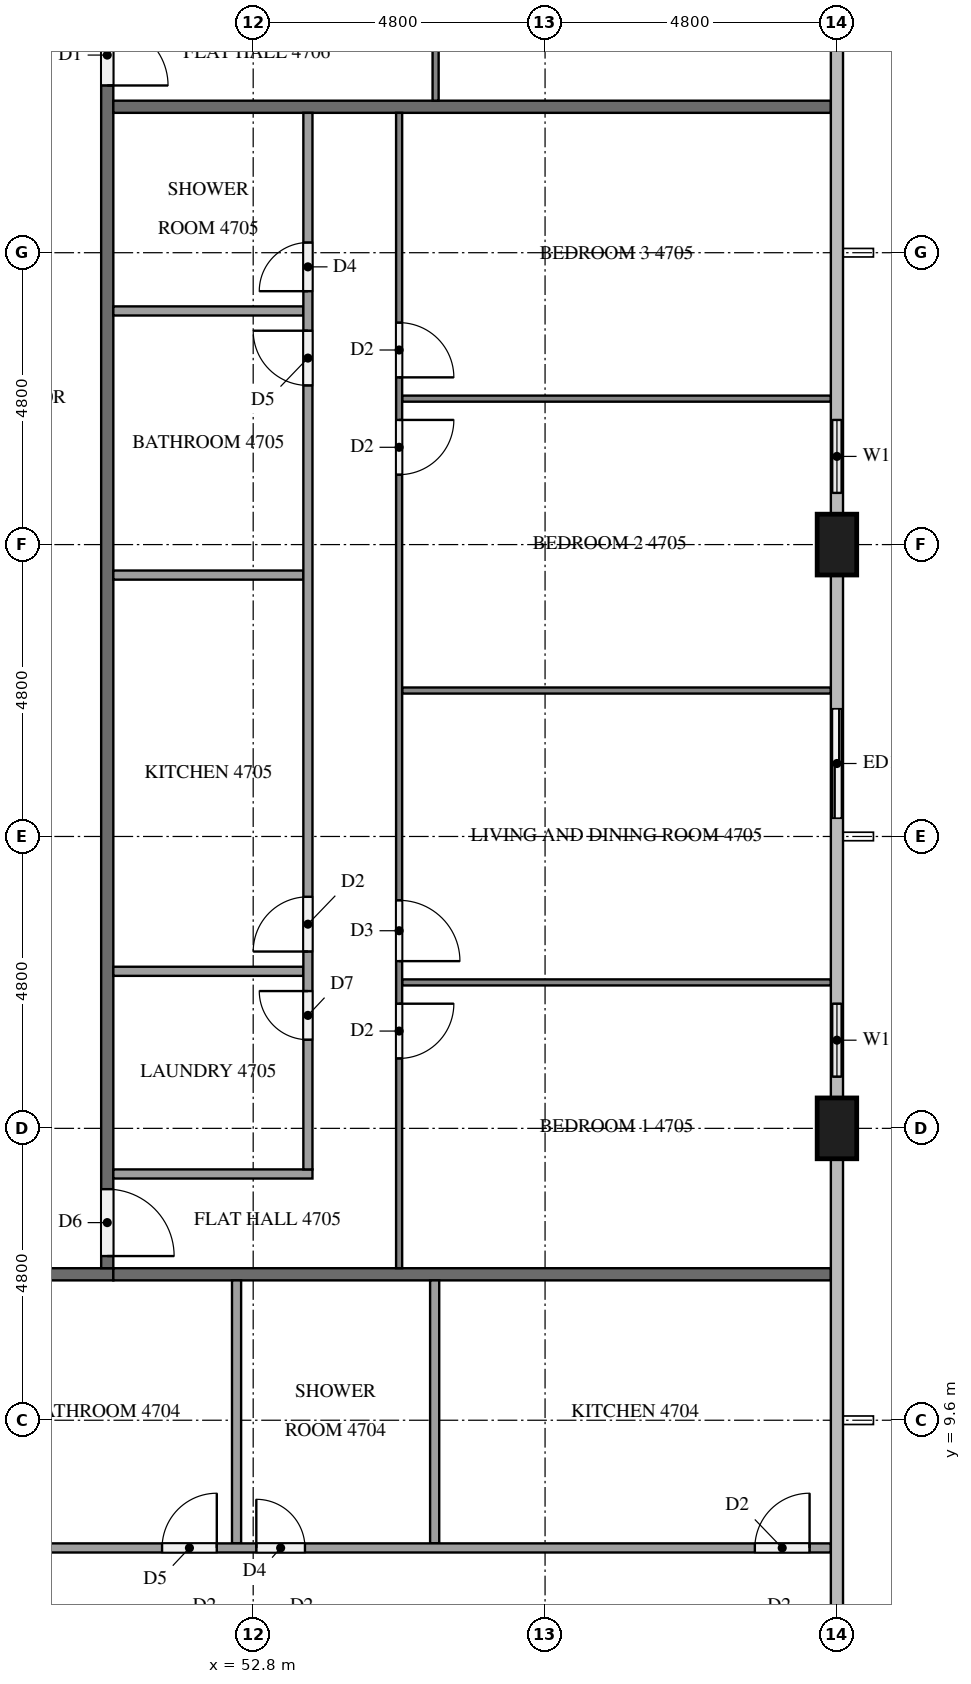
"""IFC4 building model, lengths in metres.
Left out: names, types, materials, properties, quantities, classifications, styles, units other than length and angle.
Written with IfcOpenShell. Run it as: python <this file> out.ifc"""

import sys

from ifc_helpers import new_model, si_unit, direction, frame, frame_2d, origin, origin_2d, place, context, subcontext, project, spatial, rectangle, extrude, element, fill, save


model = new_model("IFC4")
c1 = context("Model", 3, precision=1e-05, world=origin(), true_north=direction((0.0, 1.0)))
c2 = subcontext(c1, "Body", "Model", "MODEL_VIEW")
j1 = project(units=[si_unit("LENGTHUNIT", "METRE"), si_unit("PLANEANGLEUNIT", "RADIAN")], contexts=[c1])
p1 = place(None, origin())
s1 = spatial("IfcSite", under=j1, at=p1, CompositionType="ELEMENT")
p2 = place(p1, origin())
s2 = spatial("IfcBuilding", under=s1, at=p2, CompositionType="ELEMENT")
p3 = place(p2, frame((0.0, 0.0, 182.4)))
s3 = spatial("IfcBuildingStorey", under=s2, at=p3, CompositionType="ELEMENT", Elevation=182.4)
for number, where, z_axis, x_axis in (
    (1, (62.4, 14.4, 0.0), (0.0, 0.0, 1.0), (0.0, 1.0, 0.0)),
    (2, (62.4, 24.0, 0.0), (0.0, 0.0, 1.0), (0.0, 1.0, 0.0)),
):
    element("IfcColumn", number, at=place(p3, frame(where, z_axis=z_axis, x_axis=x_axis)), inside=s3, PredefinedType="COLUMN", context=c2, shape_type="SweptSolid", body=[
        extrude(rectangle(XDim=1.0, YDim=0.65, at=origin_2d()), origin(), (0.0, 0.0, 1.0), 3.2),
    ])
p4 = place(p3, frame((62.4, 14.9, 0.0), z_axis=(0.0, 0.0, 1.0), x_axis=(0.0, 1.0, 0.0)))
e3 = element("IfcWall", 3, at=p4, inside=s3, PredefinedType="SOLIDWALL", context=c2, shape_type="SweptSolid", body=[
    extrude(rectangle(XDim=1.9, YDim=0.15, at=frame_2d((0.95, 0.0))), origin(), (0.0, 0.0, 1.0), 3.2),
])
p5 = place(p4, frame((0.35, 0.0, 0.9)))
e4 = element("IfcOpeningElement", 4, at=p5, cuts=e3, PredefinedType="OPENING", context=c2, shape_type="SweptSolid", body=[
    extrude(rectangle(XDim=1.2, YDim=1.4, at=frame_2d((0.6, 0.7))), frame((0.0, 0.085, 0.0), z_axis=(0.0, -1.0, 0.0), x_axis=(1.0, 0.0, 0.0)), (0.0, 0.0, 1.0), 0.17),
])
p6 = place(p3, frame((62.4, 19.2, 0.0), z_axis=(0.0, 0.0, 1.0), x_axis=(0.0, 1.0, 0.0)))
e5 = element("IfcWall", 5, at=p6, inside=s3, PredefinedType="SOLIDWALL", context=c2, shape_type="SweptSolid", body=[
    extrude(rectangle(XDim=2.4, YDim=0.15, at=frame_2d((1.2, 0.0))), origin(), (0.0, 0.0, 1.0), 3.2),
])
p7 = place(p6, frame((0.3, 0.0, 0.0)))
e6 = element("IfcOpeningElement", 6, at=p7, cuts=e5, PredefinedType="OPENING", context=c2, shape_type="SweptSolid", body=[
    extrude(rectangle(XDim=1.8, YDim=2.4, at=frame_2d((0.9, 1.2))), frame((0.0, 0.085, 0.0), z_axis=(0.0, -1.0, 0.0), x_axis=(1.0, 0.0, 0.0)), (0.0, 0.0, 1.0), 0.17),
])
p8 = place(p3, frame((62.4, 24.5, 0.0), z_axis=(0.0, 0.0, 1.0), x_axis=(0.0, 1.0, 0.0)))
e7 = element("IfcWall", 7, at=p8, inside=s3, PredefinedType="SOLIDWALL", context=c2, shape_type="SweptSolid", body=[
    extrude(rectangle(XDim=1.9, YDim=0.15, at=frame_2d((0.95, 0.0))), origin(), (0.0, 0.0, 1.0), 3.2),
])
p9 = place(p8, frame((0.35, 0.0, 0.9)))
e8 = element("IfcOpeningElement", 8, at=p9, cuts=e7, PredefinedType="OPENING", context=c2, shape_type="SweptSolid", body=[
    extrude(rectangle(XDim=1.2, YDim=1.4, at=frame_2d((0.6, 0.7))), frame((0.0, 0.085, 0.0), z_axis=(0.0, -1.0, 0.0), x_axis=(1.0, 0.0, 0.0)), (0.0, 0.0, 1.0), 0.17),
])
p10 = place(p3, frame((50.5, 12.0, 0.0), z_axis=(0.0, 0.0, 1.0), x_axis=(-1.0, 0.0, 0.0)))
e9 = element("IfcWall", 9, at=p10, inside=s3, PredefinedType="PARTITIONING", context=c2, shape_type="SweptSolid", body=[
    extrude(rectangle(XDim=38.6, YDim=0.2, at=frame_2d((19.3, 0.0))), origin(), (0.0, 0.0, 1.0), 3.2),
])
p11 = place(p10, frame((31.65, 0.0, 0.0)))
e10 = element("IfcOpeningElement", 10, at=p11, cuts=e9, PredefinedType="OPENING", context=c2, shape_type="SweptSolid", body=[
    extrude(rectangle(XDim=1.0, YDim=2.1, at=frame_2d((0.5, 1.05))), frame((0.0, 0.11, 0.0), z_axis=(0.0, -1.0, 0.0), x_axis=(1.0, 0.0, 0.0)), (0.0, 0.0, 1.0), 0.22),
])
p12 = place(p10, frame((17.25, 0.0, 0.0)))
e11 = element("IfcOpeningElement", 11, at=p12, cuts=e9, PredefinedType="OPENING", context=c2, shape_type="SweptSolid", body=[
    extrude(rectangle(XDim=1.0, YDim=2.1, at=frame_2d((0.5, 1.05))), frame((0.0, 0.11, 0.0), z_axis=(0.0, -1.0, 0.0), x_axis=(1.0, 0.0, 0.0)), (0.0, 0.0, 1.0), 0.22),
])
p13 = place(p10, frame((7.65, 0.0, 0.0)))
e12 = element("IfcOpeningElement", 12, at=p13, cuts=e9, PredefinedType="OPENING", context=c2, shape_type="SweptSolid", body=[
    extrude(rectangle(XDim=1.0, YDim=2.1, at=frame_2d((0.5, 1.05))), frame((0.0, 0.11, 0.0), z_axis=(0.0, -1.0, 0.0), x_axis=(1.0, 0.0, 0.0)), (0.0, 0.0, 1.0), 0.22),
])
p14 = place(p10, frame((5.9, 0.0, 0.0)))
e13 = element("IfcOpeningElement", 13, at=p14, cuts=e9, PredefinedType="OPENING", context=c2, shape_type="SweptSolid", body=[
    extrude(rectangle(XDim=1.1, YDim=2.1, at=frame_2d((0.55, 1.05))), frame((0.0, 0.11, 0.0), z_axis=(0.0, -1.0, 0.0), x_axis=(1.0, 0.0, 0.0)), (0.0, 0.0, 1.0), 0.22),
])
p15 = place(p3, frame((50.4, 40.7, 0.0), z_axis=(0.0, 0.0, 1.0), x_axis=(0.0, -1.0, 0.0)))
e14 = element("IfcWall", 14, at=p15, inside=s3, PredefinedType="PARTITIONING", context=c2, shape_type="SweptSolid", body=[
    extrude(rectangle(XDim=28.6, YDim=0.2, at=frame_2d((14.3, 0.0))), origin(), (0.0, 0.0, 1.0), 3.2),
])
p16 = place(p15, frame((27.3, 0.0, 0.0)))
e15 = element("IfcOpeningElement", 15, at=p16, cuts=e14, PredefinedType="OPENING", context=c2, shape_type="SweptSolid", body=[
    extrude(rectangle(XDim=1.1, YDim=2.1, at=frame_2d((0.55, 1.05))), frame((0.0, 0.11, 0.0), z_axis=(0.0, -1.0, 0.0), x_axis=(1.0, 0.0, 0.0)), (0.0, 0.0, 1.0), 0.22),
])
p17 = place(p15, frame((8.15, 0.0, 0.0)))
e16 = element("IfcOpeningElement", 16, at=p17, cuts=e14, PredefinedType="OPENING", context=c2, shape_type="SweptSolid", body=[
    extrude(rectangle(XDim=1.0, YDim=2.1, at=frame_2d((0.5, 1.05))), frame((0.0, 0.11, 0.0), z_axis=(0.0, -1.0, 0.0), x_axis=(1.0, 0.0, 0.0)), (0.0, 0.0, 1.0), 0.22),
])
p18 = place(p15, frame((0.95, 0.0, 0.0)))
e17 = element("IfcOpeningElement", 17, at=p18, cuts=e14, PredefinedType="OPENING", context=c2, shape_type="SweptSolid", body=[
    extrude(rectangle(XDim=1.0, YDim=2.1, at=frame_2d((0.5, 1.05))), frame((0.0, 0.11, 0.0), z_axis=(0.0, -1.0, 0.0), x_axis=(1.0, 0.0, 0.0)), (0.0, 0.0, 1.0), 0.22),
])
for number, where, z_axis, x_axis in (
    (18, (50.5, 12.0, 0.0), (0.0, 0.0, 1.0), (1.0, 0.0, 0.0)),
    (19, (50.5, 31.2, 0.0), (0.0, 0.0, 1.0), (1.0, 0.0, 0.0)),
):
    element("IfcWall", number, at=place(p3, frame(where, z_axis=z_axis, x_axis=x_axis)), inside=s3, PredefinedType="PARTITIONING", context=c2, shape_type="SweptSolid", body=[
        extrude(rectangle(XDim=11.8, YDim=0.2, at=frame_2d((5.9, 0.0))), origin(), (0.0, 0.0, 1.0), 3.2),
    ])
for number, where, z_axis, x_axis in (
    (20, (52.527, 11.9, 0.0), (0.0, 0.0, 1.0), (0.0, -1.0, 0.0)),
    (21, (55.784, 11.9, 0.0), (0.0, 0.0, 1.0), (0.0, -1.0, 0.0)),
):
    element("IfcWall", number, at=place(p3, frame(where, z_axis=z_axis, x_axis=x_axis)), inside=s3, PredefinedType="PARTITIONING", context=c2, shape_type="SweptSolid", body=[
        extrude(rectangle(XDim=4.325, YDim=0.15, at=frame_2d((2.163, 0.0))), origin(), (0.0, 0.0, 1.0), 3.2),
    ])
p19 = place(p3, frame((44.925, 7.5, 0.0), z_axis=(0.0, 0.0, 1.0), x_axis=(1.0, 0.0, 0.0)))
e22 = element("IfcWall", 22, at=p19, inside=s3, PredefinedType="PARTITIONING", context=c2, shape_type="SweptSolid", body=[
    extrude(rectangle(XDim=17.375, YDim=0.15, at=frame_2d((8.688, 0.0))), origin(), (0.0, 0.0, 1.0), 3.2),
])
p20 = place(p19, frame((0.3, 0.0, 0.0)))
e23 = element("IfcOpeningElement", 23, at=p20, cuts=e22, PredefinedType="OPENING", context=c2, shape_type="SweptSolid", body=[
    extrude(rectangle(XDim=0.8, YDim=2.1, at=frame_2d((0.4, 1.05))), frame((0.0, 0.085, 0.0), z_axis=(0.0, -1.0, 0.0), x_axis=(1.0, 0.0, 0.0)), (0.0, 0.0, 1.0), 0.17),
])
p21 = place(p19, frame((6.377, 0.0, 0.0)))
e24 = element("IfcOpeningElement", 24, at=p21, cuts=e22, PredefinedType="OPENING", context=c2, shape_type="SweptSolid", body=[
    extrude(rectangle(XDim=0.9, YDim=2.1, at=frame_2d((0.45, 1.05))), frame((0.0, 0.085, 0.0), z_axis=(0.0, -1.0, 0.0), x_axis=(1.0, 0.0, 0.0)), (0.0, 0.0, 1.0), 0.17),
])
p22 = place(p19, frame((7.927, 0.0, 0.0)))
e25 = element("IfcOpeningElement", 25, at=p22, cuts=e22, PredefinedType="OPENING", context=c2, shape_type="SweptSolid", body=[
    extrude(rectangle(XDim=0.8, YDim=2.1, at=frame_2d((0.4, 1.05))), frame((0.0, 0.085, 0.0), z_axis=(0.0, -1.0, 0.0), x_axis=(1.0, 0.0, 0.0)), (0.0, 0.0, 1.0), 0.17),
])
p23 = place(p19, frame((16.125, 0.0, 0.0)))
e26 = element("IfcOpeningElement", 26, at=p23, cuts=e22, PredefinedType="OPENING", context=c2, shape_type="SweptSolid", body=[
    extrude(rectangle(XDim=0.9, YDim=2.1, at=frame_2d((0.45, 1.05))), frame((0.0, 0.085, 0.0), z_axis=(0.0, -1.0, 0.0), x_axis=(1.0, 0.0, 0.0)), (0.0, 0.0, 1.0), 0.17),
])
for number, where, z_axis, x_axis in (
    (27, (55.25, 16.8, 0.0), (0.0, 0.0, 1.0), (1.0, 0.0, 0.0)),
    (28, (55.25, 21.6, 0.0), (0.0, 0.0, 1.0), (1.0, 0.0, 0.0)),
    (29, (55.25, 26.4, 0.0), (0.0, 0.0, 1.0), (1.0, 0.0, 0.0)),
):
    element("IfcWall", number, at=place(p3, frame(where, z_axis=z_axis, x_axis=x_axis)), inside=s3, PredefinedType="PARTITIONING", context=c2, shape_type="SweptSolid", body=[
        extrude(rectangle(XDim=7.05, YDim=0.1, at=frame_2d((3.525, 0.0))), origin(), (0.0, 0.0, 1.0), 3.2),
    ])
p24 = place(p3, frame((55.2, 31.1, 0.0), z_axis=(0.0, 0.0, 1.0), x_axis=(0.0, -1.0, 0.0)))
e30 = element("IfcWall", 30, at=p24, inside=s3, PredefinedType="PARTITIONING", context=c2, shape_type="SweptSolid", body=[
    extrude(rectangle(XDim=19.0, YDim=0.1, at=frame_2d((9.5, 0.0))), origin(), (0.0, 0.0, 1.0), 3.2),
])
p25 = place(p24, frame((14.65, 0.0, 0.0)))
e31 = element("IfcOpeningElement", 31, at=p25, cuts=e30, PredefinedType="OPENING", context=c2, shape_type="SweptSolid", body=[
    extrude(rectangle(XDim=0.9, YDim=2.1, at=frame_2d((0.45, 1.05))), frame((0.0, 0.06, 0.0), z_axis=(0.0, -1.0, 0.0), x_axis=(1.0, 0.0, 0.0)), (0.0, 0.0, 1.0), 0.12),
])
p26 = place(p24, frame((12.95, 0.0, 0.0)))
e32 = element("IfcOpeningElement", 32, at=p26, cuts=e30, PredefinedType="OPENING", context=c2, shape_type="SweptSolid", body=[
    extrude(rectangle(XDim=1.0, YDim=2.1, at=frame_2d((0.5, 1.05))), frame((0.0, 0.06, 0.0), z_axis=(0.0, -1.0, 0.0), x_axis=(1.0, 0.0, 0.0)), (0.0, 0.0, 1.0), 0.12),
])
p27 = place(p24, frame((5.05, 0.0, 0.0)))
e33 = element("IfcOpeningElement", 33, at=p27, cuts=e30, PredefinedType="OPENING", context=c2, shape_type="SweptSolid", body=[
    extrude(rectangle(XDim=0.9, YDim=2.1, at=frame_2d((0.45, 1.05))), frame((0.0, 0.06, 0.0), z_axis=(0.0, -1.0, 0.0), x_axis=(1.0, 0.0, 0.0)), (0.0, 0.0, 1.0), 0.12),
])
p28 = place(p24, frame((3.45, 0.0, 0.0)))
e34 = element("IfcOpeningElement", 34, at=p28, cuts=e30, PredefinedType="OPENING", context=c2, shape_type="SweptSolid", body=[
    extrude(rectangle(XDim=0.9, YDim=2.1, at=frame_2d((0.45, 1.05))), frame((0.0, 0.06, 0.0), z_axis=(0.0, -1.0, 0.0), x_axis=(1.0, 0.0, 0.0)), (0.0, 0.0, 1.0), 0.12),
])
for number, where, z_axis, x_axis in (
    (35, (50.5, 16.983, 0.0), (0.0, 0.0, 1.0), (1.0, 0.0, 0.0)),
    (36, (50.5, 23.498, 0.0), (0.0, 0.0, 1.0), (1.0, 0.0, 0.0)),
    (37, (50.5, 27.842, 0.0), (0.0, 0.0, 1.0), (1.0, 0.0, 0.0)),
):
    element("IfcWall", number, at=place(p3, frame(where, z_axis=z_axis, x_axis=x_axis)), inside=s3, PredefinedType="PARTITIONING", context=c2, shape_type="SweptSolid", body=[
        extrude(rectangle(XDim=3.125, YDim=0.15, at=frame_2d((1.562, 0.0))), origin(), (0.0, 0.0, 1.0), 3.2),
    ])
p29 = place(p3, frame((50.5, 13.65, 0.0), z_axis=(0.0, 0.0, 1.0), x_axis=(1.0, 0.0, 0.0)))
e38 = element("IfcWall", 38, at=p29, inside=s3, PredefinedType="PARTITIONING", context=c2, shape_type="SweptSolid", body=[
    extrude(rectangle(XDim=3.275, YDim=0.15, at=frame_2d((1.637, 0.0))), origin(), (0.0, 0.0, 1.0), 3.2),
])
p30 = place(p3, frame((53.7, 13.725, 0.0), z_axis=(0.0, 0.0, 1.0), x_axis=(0.0, 1.0, 0.0)))
e39 = element("IfcWall", 39, at=p30, inside=s3, PredefinedType="PARTITIONING", context=c2, shape_type="SweptSolid", body=[
    extrude(rectangle(XDim=17.375, YDim=0.15, at=frame_2d((8.688, 0.0))), origin(), (0.0, 0.0, 1.0), 3.2),
])
p31 = place(p30, frame((2.133, 0.0, 0.0)))
e40 = element("IfcOpeningElement", 40, at=p31, cuts=e39, PredefinedType="OPENING", context=c2, shape_type="SweptSolid", body=[
    extrude(rectangle(XDim=0.8, YDim=2.1, at=frame_2d((0.4, 1.05))), frame((0.0, 0.085, 0.0), z_axis=(0.0, -1.0, 0.0), x_axis=(1.0, 0.0, 0.0)), (0.0, 0.0, 1.0), 0.17),
])
p32 = place(p30, frame((3.583, 0.0, 0.0)))
e41 = element("IfcOpeningElement", 41, at=p32, cuts=e39, PredefinedType="OPENING", context=c2, shape_type="SweptSolid", body=[
    extrude(rectangle(XDim=0.9, YDim=2.1, at=frame_2d((0.45, 1.05))), frame((0.0, 0.085, 0.0), z_axis=(0.0, -1.0, 0.0), x_axis=(1.0, 0.0, 0.0)), (0.0, 0.0, 1.0), 0.17),
])
p33 = place(p30, frame((12.892, 0.0, 0.0)))
e42 = element("IfcOpeningElement", 42, at=p33, cuts=e39, PredefinedType="OPENING", context=c2, shape_type="SweptSolid", body=[
    extrude(rectangle(XDim=0.9, YDim=2.1, at=frame_2d((0.45, 1.05))), frame((0.0, 0.085, 0.0), z_axis=(0.0, -1.0, 0.0), x_axis=(1.0, 0.0, 0.0)), (0.0, 0.0, 1.0), 0.17),
])
p34 = place(p30, frame((14.442, 0.0, 0.0)))
e43 = element("IfcOpeningElement", 43, at=p34, cuts=e39, PredefinedType="OPENING", context=c2, shape_type="SweptSolid", body=[
    extrude(rectangle(XDim=0.8, YDim=2.1, at=frame_2d((0.4, 1.05))), frame((0.0, 0.085, 0.0), z_axis=(0.0, -1.0, 0.0), x_axis=(1.0, 0.0, 0.0)), (0.0, 0.0, 1.0), 0.17),
])
p35 = place(p3, frame((55.8, 38.3, 0.0), z_axis=(0.0, 0.0, 1.0), x_axis=(0.0, -1.0, 0.0)))
e44 = element("IfcWall", 44, at=p35, inside=s3, PredefinedType="PARTITIONING", context=c2, shape_type="SweptSolid", body=[
    extrude(rectangle(XDim=7.0, YDim=0.1, at=frame_2d((3.5, 0.0))), origin(), (0.0, 0.0, 1.0), 3.2),
])
p36 = place(p35, frame((0.3, 0.0, 0.0)))
e45 = element("IfcOpeningElement", 45, at=p36, cuts=e44, PredefinedType="OPENING", context=c2, shape_type="SweptSolid", body=[
    extrude(rectangle(XDim=1.0, YDim=2.1, at=frame_2d((0.5, 1.05))), frame((0.0, 0.06, 0.0), z_axis=(0.0, -1.0, 0.0), x_axis=(1.0, 0.0, 0.0)), (0.0, 0.0, 1.0), 0.12),
])
p37 = place(p5, origin())
e46 = element("IfcWindow", 46, at=p37, inside=s3, PartitioningType="SINGLE_PANEL", PredefinedType="WINDOW", context=c2, shape_type="SweptSolid", body=[
    extrude(rectangle(XDim=1.2, YDim=1.4, at=frame_2d((0.6, 0.7))), frame((0.0, 0.03, 0.0), z_axis=(0.0, -1.0, 0.0), x_axis=(1.0, 0.0, 0.0)), (0.0, 0.0, 1.0), 0.06),
])
fill(e4, e46)
p38 = place(p7, origin())
e47 = element("IfcDoor", 47, at=p38, inside=s3, OperationType="SLIDING_TO_RIGHT", PredefinedType="DOOR", context=c2, shape_type="SweptSolid", body=[
    extrude(rectangle(XDim=1.8, YDim=2.4, at=frame_2d((0.9, 1.2))), frame((0.0, 0.025, 0.0), z_axis=(0.0, -1.0, 0.0), x_axis=(1.0, 0.0, 0.0)), (0.0, 0.0, 1.0), 0.05),
])
fill(e6, e47)
p39 = place(p9, origin())
e48 = element("IfcWindow", 48, at=p39, inside=s3, PartitioningType="SINGLE_PANEL", PredefinedType="WINDOW", context=c2, shape_type="SweptSolid", body=[
    extrude(rectangle(XDim=1.2, YDim=1.4, at=frame_2d((0.6, 0.7))), frame((0.0, 0.03, 0.0), z_axis=(0.0, -1.0, 0.0), x_axis=(1.0, 0.0, 0.0)), (0.0, 0.0, 1.0), 0.06),
])
fill(e8, e48)
p40 = place(p16, origin())
e49 = element("IfcDoor", 49, at=p40, inside=s3, OperationType="SINGLE_SWING_RIGHT", PredefinedType="DOOR", context=c2, shape_type="SweptSolid", body=[
    extrude(rectangle(XDim=1.1, YDim=2.1, at=frame_2d((0.55, 1.05))), frame((0.0, 0.025, 0.0), z_axis=(0.0, -1.0, 0.0), x_axis=(1.0, 0.0, 0.0)), (0.0, 0.0, 1.0), 0.05),
])
fill(e15, e49)
p41 = place(p17, origin())
e50 = element("IfcDoor", 50, at=p41, inside=s3, OperationType="SINGLE_SWING_RIGHT", PredefinedType="DOOR", context=c2, shape_type="SweptSolid", body=[
    extrude(rectangle(XDim=1.0, YDim=2.1, at=frame_2d((0.5, 1.05))), frame((0.0, 0.025, 0.0), z_axis=(0.0, -1.0, 0.0), x_axis=(1.0, 0.0, 0.0)), (0.0, 0.0, 1.0), 0.05),
])
fill(e16, e50)
p42 = place(p21, origin())
e51 = element("IfcDoor", 51, at=p42, inside=s3, OperationType="SINGLE_SWING_RIGHT", PredefinedType="DOOR", context=c2, shape_type="SweptSolid", body=[
    extrude(rectangle(XDim=0.9, YDim=2.1, at=frame_2d((0.45, 1.05))), frame((0.0, 0.025, 0.0), z_axis=(0.0, -1.0, 0.0), x_axis=(1.0, 0.0, 0.0)), (0.0, 0.0, 1.0), 0.05),
])
fill(e24, e51)
p43 = place(p22, origin())
e52 = element("IfcDoor", 52, at=p43, inside=s3, OperationType="SINGLE_SWING_LEFT", PredefinedType="DOOR", context=c2, shape_type="SweptSolid", body=[
    extrude(rectangle(XDim=0.8, YDim=2.1, at=frame_2d((0.4, 1.05))), frame((0.0, 0.025, 0.0), z_axis=(0.0, -1.0, 0.0), x_axis=(1.0, 0.0, 0.0)), (0.0, 0.0, 1.0), 0.05),
])
fill(e25, e52)
p44 = place(p23, origin())
e53 = element("IfcDoor", 53, at=p44, inside=s3, OperationType="SINGLE_SWING_RIGHT", PredefinedType="DOOR", context=c2, shape_type="SweptSolid", body=[
    extrude(rectangle(XDim=0.9, YDim=2.1, at=frame_2d((0.45, 1.05))), frame((0.0, 0.025, 0.0), z_axis=(0.0, -1.0, 0.0), x_axis=(1.0, 0.0, 0.0)), (0.0, 0.0, 1.0), 0.05),
])
fill(e26, e53)
p45 = place(p25, origin())
e54 = element("IfcDoor", 54, at=p45, inside=s3, OperationType="SINGLE_SWING_LEFT", PredefinedType="DOOR", context=c2, shape_type="SweptSolid", body=[
    extrude(rectangle(XDim=0.9, YDim=2.1, at=frame_2d((0.45, 1.05))), frame((0.0, 0.025, 0.0), z_axis=(0.0, -1.0, 0.0), x_axis=(1.0, 0.0, 0.0)), (0.0, 0.0, 1.0), 0.05),
])
fill(e31, e54)
p46 = place(p26, origin())
e55 = element("IfcDoor", 55, at=p46, inside=s3, OperationType="SINGLE_SWING_RIGHT", PredefinedType="DOOR", context=c2, shape_type="SweptSolid", body=[
    extrude(rectangle(XDim=1.0, YDim=2.1, at=frame_2d((0.5, 1.05))), frame((0.0, 0.025, 0.0), z_axis=(0.0, -1.0, 0.0), x_axis=(1.0, 0.0, 0.0)), (0.0, 0.0, 1.0), 0.05),
])
fill(e32, e55)
p47 = place(p27, origin())
e56 = element("IfcDoor", 56, at=p47, inside=s3, OperationType="SINGLE_SWING_LEFT", PredefinedType="DOOR", context=c2, shape_type="SweptSolid", body=[
    extrude(rectangle(XDim=0.9, YDim=2.1, at=frame_2d((0.45, 1.05))), frame((0.0, 0.025, 0.0), z_axis=(0.0, -1.0, 0.0), x_axis=(1.0, 0.0, 0.0)), (0.0, 0.0, 1.0), 0.05),
])
fill(e33, e56)
p48 = place(p28, origin())
e57 = element("IfcDoor", 57, at=p48, inside=s3, OperationType="SINGLE_SWING_RIGHT", PredefinedType="DOOR", context=c2, shape_type="SweptSolid", body=[
    extrude(rectangle(XDim=0.9, YDim=2.1, at=frame_2d((0.45, 1.05))), frame((0.0, 0.025, 0.0), z_axis=(0.0, -1.0, 0.0), x_axis=(1.0, 0.0, 0.0)), (0.0, 0.0, 1.0), 0.05),
])
fill(e34, e57)
p49 = place(p31, origin())
e58 = element("IfcDoor", 58, at=p49, inside=s3, OperationType="SINGLE_SWING_RIGHT", PredefinedType="DOOR", context=c2, shape_type="SweptSolid", body=[
    extrude(rectangle(XDim=0.8, YDim=2.1, at=frame_2d((0.4, 1.05))), frame((0.0, 0.025, 0.0), z_axis=(0.0, -1.0, 0.0), x_axis=(1.0, 0.0, 0.0)), (0.0, 0.0, 1.0), 0.05),
])
fill(e40, e58)
p50 = place(p32, origin())
e59 = element("IfcDoor", 59, at=p50, inside=s3, OperationType="SINGLE_SWING_LEFT", PredefinedType="DOOR", context=c2, shape_type="SweptSolid", body=[
    extrude(rectangle(XDim=0.9, YDim=2.1, at=frame_2d((0.45, 1.05))), frame((0.0, 0.025, 0.0), z_axis=(0.0, -1.0, 0.0), x_axis=(1.0, 0.0, 0.0)), (0.0, 0.0, 1.0), 0.05),
])
fill(e41, e59)
p51 = place(p33, origin())
e60 = element("IfcDoor", 60, at=p51, inside=s3, OperationType="SINGLE_SWING_RIGHT", PredefinedType="DOOR", context=c2, shape_type="SweptSolid", body=[
    extrude(rectangle(XDim=0.9, YDim=2.1, at=frame_2d((0.45, 1.05))), frame((0.0, 0.025, 0.0), z_axis=(0.0, -1.0, 0.0), x_axis=(1.0, 0.0, 0.0)), (0.0, 0.0, 1.0), 0.05),
])
fill(e42, e60)
p52 = place(p34, origin())
e61 = element("IfcDoor", 61, at=p52, inside=s3, OperationType="SINGLE_SWING_LEFT", PredefinedType="DOOR", context=c2, shape_type="SweptSolid", body=[
    extrude(rectangle(XDim=0.8, YDim=2.1, at=frame_2d((0.4, 1.05))), frame((0.0, 0.025, 0.0), z_axis=(0.0, -1.0, 0.0), x_axis=(1.0, 0.0, 0.0)), (0.0, 0.0, 1.0), 0.05),
])
fill(e43, e61)
save(model, sys.argv[1])
